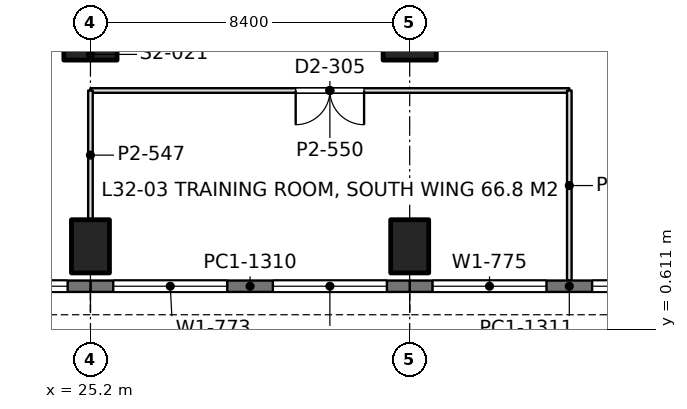
"""IFC4 building model, lengths in metres.
Left out: names, types, materials, properties, quantities, classifications, styles, units other than length and angle.
Written with IfcOpenShell. Run it as: python <this file> out.ifc"""

import sys

from ifc_helpers import new_model, si_unit, direction, frame, frame_2d, origin, origin_2d, place, context, subcontext, project, spatial, rectangle, extrude, element, fill, save


model = new_model("IFC4")
c1 = context("Model", 3, precision=1e-05, world=origin(), true_north=direction((0.0, 1.0)))
c2 = subcontext(c1, "Body", "Model", "MODEL_VIEW")
j1 = project(units=[si_unit("LENGTHUNIT", "METRE"), si_unit("PLANEANGLEUNIT", "RADIAN")], contexts=[c1])
p1 = place(None, origin())
s1 = spatial("IfcSite", under=j1, at=p1, CompositionType="ELEMENT")
p2 = place(p1, origin())
s2 = spatial("IfcBuilding", under=s1, at=p2, CompositionType="ELEMENT")
p3 = place(p2, frame((0.0, 0.0, 142.8)))
s3 = spatial("IfcBuildingStorey", under=s2, at=p3, CompositionType="ELEMENT", Elevation=142.8)
p4 = place(p3, frame((25.2, 2.8, 0.0), z_axis=(0.0, 0.0, 1.0), x_axis=(1.0, 0.0, 0.0)))
e1 = element("IfcColumn", 1, at=p4, inside=s3, PredefinedType="COLUMN", context=c2, shape_type="SweptSolid", body=[
    extrude(rectangle(XDim=1.0, YDim=1.4, at=origin_2d()), origin(), (0.0, 0.0, 1.0), 4.2),
])
p5 = place(p3, frame((25.2, 8.4, 0.0), z_axis=(0.0, 0.0, 1.0), x_axis=(1.0, 0.0, 0.0)))
e2 = element("IfcColumn", 2, at=p5, inside=s3, PredefinedType="COLUMN", context=c2, shape_type="SweptSolid", body=[
    extrude(rectangle(XDim=1.4, YDim=1.4, at=origin_2d()), origin(), (0.0, 0.0, 1.0), 4.2),
])
p6 = place(p3, frame((33.6, 2.8, 0.0), z_axis=(0.0, 0.0, 1.0), x_axis=(1.0, 0.0, 0.0)))
e3 = element("IfcColumn", 3, at=p6, inside=s3, PredefinedType="COLUMN", context=c2, shape_type="SweptSolid", body=[
    extrude(rectangle(XDim=1.0, YDim=1.4, at=origin_2d()), origin(), (0.0, 0.0, 1.0), 4.2),
])
p7 = place(p3, frame((33.6, 8.4, 0.0), z_axis=(0.0, 0.0, 1.0), x_axis=(1.0, 0.0, 0.0)))
e4 = element("IfcColumn", 4, at=p7, inside=s3, PredefinedType="COLUMN", context=c2, shape_type="SweptSolid", body=[
    extrude(rectangle(XDim=1.4, YDim=1.4, at=origin_2d()), origin(), (0.0, 0.0, 1.0), 4.2),
])
p8 = place(p3, frame((42.0, 1.75, 0.0), z_axis=(0.0, 0.0, 1.0), x_axis=(-1.0, 0.0, 0.0)))
e5 = element("IfcWall", 5, at=p8, inside=s3, PredefinedType="SOLIDWALL", context=c2, shape_type="SweptSolid", body=[
    extrude(rectangle(XDim=8.4, YDim=0.3, at=frame_2d((4.2, 0.0))), origin(), (0.0, 0.0, 1.0), 4.05),
])
p9 = place(p8, frame((0.6, 0.0, 0.9)))
e6 = element("IfcOpeningElement", 6, at=p9, cuts=e5, PredefinedType="OPENING", context=c2, shape_type="SweptSolid", body=[
    extrude(rectangle(XDim=3.0, YDim=1.9, at=frame_2d((1.5, 0.95))), frame((0.0, 0.16, 0.0), z_axis=(0.0, -1.0, 0.0), x_axis=(1.0, 0.0, 0.0)), (0.0, 0.0, 1.0), 0.32),
])
p10 = place(p8, frame((4.8, 0.0, 0.9)))
e7 = element("IfcOpeningElement", 7, at=p10, cuts=e5, PredefinedType="OPENING", context=c2, shape_type="SweptSolid", body=[
    extrude(rectangle(XDim=3.0, YDim=1.9, at=frame_2d((1.5, 0.95))), frame((0.0, 0.16, 0.0), z_axis=(0.0, -1.0, 0.0), x_axis=(1.0, 0.0, 0.0)), (0.0, 0.0, 1.0), 0.32),
])
p11 = place(p3, frame((33.6, 1.75, 0.0), z_axis=(0.0, 0.0, 1.0), x_axis=(-1.0, 0.0, 0.0)))
e8 = element("IfcWall", 8, at=p11, inside=s3, PredefinedType="SOLIDWALL", context=c2, shape_type="SweptSolid", body=[
    extrude(rectangle(XDim=8.4, YDim=0.3, at=frame_2d((4.2, 0.0))), origin(), (0.0, 0.0, 1.0), 4.05),
])
p12 = place(p11, frame((0.6, 0.0, 0.9)))
e9 = element("IfcOpeningElement", 9, at=p12, cuts=e8, PredefinedType="OPENING", context=c2, shape_type="SweptSolid", body=[
    extrude(rectangle(XDim=3.0, YDim=1.9, at=frame_2d((1.5, 0.95))), frame((0.0, 0.16, 0.0), z_axis=(0.0, -1.0, 0.0), x_axis=(1.0, 0.0, 0.0)), (0.0, 0.0, 1.0), 0.32),
])
p13 = place(p11, frame((4.8, 0.0, 0.9)))
e10 = element("IfcOpeningElement", 10, at=p13, cuts=e8, PredefinedType="OPENING", context=c2, shape_type="SweptSolid", body=[
    extrude(rectangle(XDim=3.0, YDim=1.9, at=frame_2d((1.5, 0.95))), frame((0.0, 0.16, 0.0), z_axis=(0.0, -1.0, 0.0), x_axis=(1.0, 0.0, 0.0)), (0.0, 0.0, 1.0), 0.32),
])
p14 = place(p3, frame((25.2, 1.75, 0.0), z_axis=(0.0, 0.0, 1.0), x_axis=(-1.0, 0.0, 0.0)))
e11 = element("IfcWall", 11, at=p14, inside=s3, PredefinedType="SOLIDWALL", context=c2, shape_type="SweptSolid", body=[
    extrude(rectangle(XDim=8.4, YDim=0.3, at=frame_2d((4.2, 0.0))), origin(), (0.0, 0.0, 1.0), 4.05),
])
p15 = place(p14, frame((0.6, 0.0, 0.9)))
e12 = element("IfcOpeningElement", 12, at=p15, cuts=e11, PredefinedType="OPENING", context=c2, shape_type="SweptSolid", body=[
    extrude(rectangle(XDim=3.0, YDim=1.9, at=frame_2d((1.5, 0.95))), frame((0.0, 0.16, 0.0), z_axis=(0.0, -1.0, 0.0), x_axis=(1.0, 0.0, 0.0)), (0.0, 0.0, 1.0), 0.32),
])
p16 = place(p14, frame((4.8, 0.0, 0.9)))
e13 = element("IfcOpeningElement", 13, at=p16, cuts=e11, PredefinedType="OPENING", context=c2, shape_type="SweptSolid", body=[
    extrude(rectangle(XDim=3.0, YDim=1.9, at=frame_2d((1.5, 0.95))), frame((0.0, 0.16, 0.0), z_axis=(0.0, -1.0, 0.0), x_axis=(1.0, 0.0, 0.0)), (0.0, 0.0, 1.0), 0.32),
])
p17 = place(p3, frame((25.2, 6.9, 0.0), z_axis=(0.0, 0.0, 1.0), x_axis=(1.0, 0.0, 0.0)))
e14 = element("IfcWall", 14, at=p17, inside=s3, PredefinedType="PARTITIONING", context=c2, shape_type="SweptSolid", body=[
    extrude(rectangle(XDim=12.6, YDim=0.12, at=frame_2d((6.3, 0.0))), origin(), (0.0, 0.0, 1.0), 3.55),
])
p18 = place(p17, frame((5.4, 0.0, 0.0)))
e15 = element("IfcOpeningElement", 15, at=p18, cuts=e14, PredefinedType="OPENING", context=c2, shape_type="SweptSolid", body=[
    extrude(rectangle(XDim=1.8, YDim=2.2, at=frame_2d((0.9, 1.1))), frame((0.0, 0.07, 0.0), z_axis=(0.0, -1.0, 0.0), x_axis=(1.0, 0.0, 0.0)), (0.0, 0.0, 1.0), 0.14),
])
p19 = place(p3, frame((25.2, 3.499, 0.0), z_axis=(0.0, 0.0, 1.0), x_axis=(0.0, 1.0, 0.0)))
e16 = element("IfcWall", 16, at=p19, inside=s3, PredefinedType="PARTITIONING", context=c2, shape_type="SweptSolid", body=[
    extrude(rectangle(XDim=3.401, YDim=0.12, at=frame_2d((1.7, 0.0))), origin(), (0.0, 0.0, 1.0), 3.55),
])
p20 = place(p3, frame((37.8, 1.898, 0.0), z_axis=(0.0, 0.0, 1.0), x_axis=(0.0, 1.0, 0.0)))
e17 = element("IfcWall", 17, at=p20, inside=s3, PredefinedType="PARTITIONING", context=c2, shape_type="SweptSolid", body=[
    extrude(rectangle(XDim=5.002, YDim=0.12, at=frame_2d((2.501, 0.0))), origin(), (0.0, 0.0, 1.0), 3.56),
])
p21 = place(p9, origin())
e18 = element("IfcWindow", 18, at=p21, inside=s3, PartitioningType="SINGLE_PANEL", PredefinedType="WINDOW", context=c2, shape_type="SweptSolid", body=[
    extrude(rectangle(XDim=3.0, YDim=1.9, at=frame_2d((1.5, 0.95))), frame((0.0, 0.03, 0.0), z_axis=(0.0, -1.0, 0.0), x_axis=(1.0, 0.0, 0.0)), (0.0, 0.0, 1.0), 0.06),
])
fill(e6, e18)
p22 = place(p10, origin())
e19 = element("IfcWindow", 19, at=p22, inside=s3, PartitioningType="SINGLE_PANEL", PredefinedType="WINDOW", context=c2, shape_type="SweptSolid", body=[
    extrude(rectangle(XDim=3.0, YDim=1.9, at=frame_2d((1.5, 0.95))), frame((0.0, 0.03, 0.0), z_axis=(0.0, -1.0, 0.0), x_axis=(1.0, 0.0, 0.0)), (0.0, 0.0, 1.0), 0.06),
])
fill(e7, e19)
p23 = place(p12, origin())
e20 = element("IfcWindow", 20, at=p23, inside=s3, PartitioningType="SINGLE_PANEL", PredefinedType="WINDOW", context=c2, shape_type="SweptSolid", body=[
    extrude(rectangle(XDim=3.0, YDim=1.9, at=frame_2d((1.5, 0.95))), frame((0.0, 0.03, 0.0), z_axis=(0.0, -1.0, 0.0), x_axis=(1.0, 0.0, 0.0)), (0.0, 0.0, 1.0), 0.06),
])
fill(e9, e20)
p24 = place(p13, origin())
e21 = element("IfcWindow", 21, at=p24, inside=s3, PartitioningType="SINGLE_PANEL", PredefinedType="WINDOW", context=c2, shape_type="SweptSolid", body=[
    extrude(rectangle(XDim=3.0, YDim=1.9, at=frame_2d((1.5, 0.95))), frame((0.0, 0.03, 0.0), z_axis=(0.0, -1.0, 0.0), x_axis=(1.0, 0.0, 0.0)), (0.0, 0.0, 1.0), 0.06),
])
fill(e10, e21)
p25 = place(p15, origin())
e22 = element("IfcWindow", 22, at=p25, inside=s3, PartitioningType="SINGLE_PANEL", PredefinedType="WINDOW", context=c2, shape_type="SweptSolid", body=[
    extrude(rectangle(XDim=3.0, YDim=1.9, at=frame_2d((1.5, 0.95))), frame((0.0, 0.03, 0.0), z_axis=(0.0, -1.0, 0.0), x_axis=(1.0, 0.0, 0.0)), (0.0, 0.0, 1.0), 0.06),
])
fill(e12, e22)
p26 = place(p18, frame((1.8, 0.0, 0.0), z_axis=(0.0, 0.0, 1.0), x_axis=(-1.0, 0.0, 0.0)))
e23 = element("IfcDoor", 23, at=p26, inside=s3, OperationType="DOUBLE_DOOR_SINGLE_SWING", PredefinedType="DOOR", context=c2, shape_type="SweptSolid", body=[
    extrude(rectangle(XDim=1.8, YDim=2.2, at=frame_2d((0.9, 1.1))), frame((0.0, 0.025, 0.0), z_axis=(0.0, -1.0, 0.0), x_axis=(1.0, 0.0, 0.0)), (0.0, 0.0, 1.0), 0.05),
])
fill(e15, e23)
save(model, sys.argv[1])
